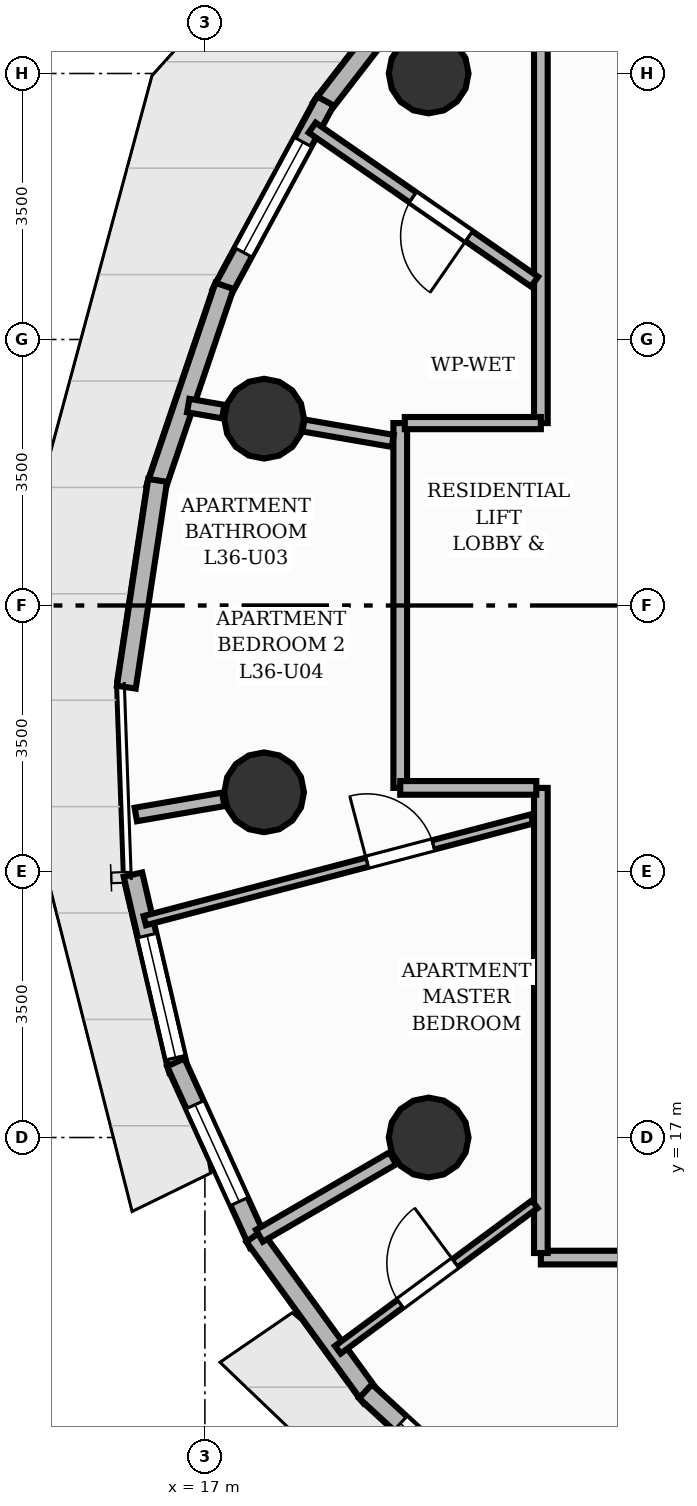
"""IFC4 building model, lengths in metres.
Left out: names, types, materials, properties, quantities, classifications, styles, units other than length and angle.
Written with IfcOpenShell. Run it as: python <this file> out.ifc"""

import sys

from ifc_helpers import new_model, si_unit, direction, frame, frame_2d, origin, origin_2d, place, context, subcontext, project, spatial, rectangle, circle, extrude, element, fill, save


model = new_model("IFC4")
c1 = context("Model", 3, precision=1e-05, world=origin(), true_north=direction((0.0, 1.0)))
c2 = subcontext(c1, "Body", "Model", "MODEL_VIEW")
j1 = project(units=[si_unit("LENGTHUNIT", "METRE"), si_unit("PLANEANGLEUNIT", "RADIAN")], contexts=[c1])
p1 = place(None, origin())
s1 = spatial("IfcSite", under=j1, at=p1, CompositionType="ELEMENT")
p2 = place(p1, origin())
s2 = spatial("IfcBuilding", under=s1, at=p2, CompositionType="ELEMENT")
p3 = place(p2, frame((0.0, 0.0, 123.36)))
s3 = spatial("IfcBuildingStorey", under=s2, at=p3, CompositionType="ELEMENT", Elevation=123.36)
for number, where, z_axis, x_axis in (
    (1, (19.944, 31.0, 0.0), (0.0, 0.0, 1.0), (1.0, 0.0, 0.0)),
    (2, (17.779, 26.458, 0.0), (0.0, 0.0, 1.0), (1.0, 0.0, 0.0)),
    (3, (17.779, 21.542, 0.0), (0.0, 0.0, 1.0), (1.0, 0.0, 0.0)),
    (4, (19.944, 17.0, 0.0), (0.0, 0.0, 1.0), (1.0, 0.0, 0.0)),
):
    element("IfcColumn", number, at=place(p3, frame(where, z_axis=z_axis, x_axis=x_axis)), inside=s3, PredefinedType="COLUMN", context=c2, shape_type="SweptSolid", body=[
        extrude(circle(Radius=0.525, at=origin_2d()), origin(), (0.0, 0.0, 1.0), 3.2),
    ])
p4 = place(p3, frame((18.525, 30.546, 0.0), z_axis=(0.0, 0.0, 1.0), x_axis=(0.611416743811, 0.791308767415, 0.0)))
e5 = element("IfcWall", 5, at=p4, inside=s3, PredefinedType="SOLIDWALL", context=c2, shape_type="SweptSolid", body=[
    extrude(rectangle(XDim=2.937, YDim=0.25, at=frame_2d((1.468, 0.0))), origin(), (0.0, 0.0, 1.0), 2.96),
])
p5 = place(p3, frame((17.213, 28.104, 0.0), z_axis=(0.0, 0.0, 1.0), x_axis=(0.476018404115, 0.879435318226, 0.0)))
e6 = element("IfcWall", 6, at=p5, inside=s3, PredefinedType="SOLIDWALL", context=c2, shape_type="SweptSolid", body=[
    extrude(rectangle(XDim=2.882, YDim=0.25, at=frame_2d((1.441, 0.0))), origin(), (0.0, 0.0, 1.0), 2.96),
])
p6 = place(p5, frame((0.616, 0.0, 0.85)))
e7 = element("IfcOpeningElement", 7, at=p6, cuts=e6, PredefinedType="OPENING", context=c2, shape_type="SweptSolid", body=[
    extrude(rectangle(XDim=1.65, YDim=1.55, at=frame_2d((0.825, 0.775))), frame((0.0, 0.135, 0.0), z_axis=(0.0, -1.0, 0.0), x_axis=(1.0, 0.0, 0.0)), (0.0, 0.0, 1.0), 0.27),
])
p7 = place(p3, frame((16.351, 25.538, 0.0), z_axis=(0.0, 0.0, 1.0), x_axis=(0.321473951892, 0.946918422175, 0.0)))
e8 = element("IfcWall", 8, at=p7, inside=s3, PredefinedType="SOLIDWALL", context=c2, shape_type="SweptSolid", body=[
    extrude(rectangle(XDim=2.818, YDim=0.25, at=frame_2d((1.409, 0.0))), origin(), (0.0, 0.0, 1.0), 2.96),
])
p8 = place(p3, frame((15.966, 22.925, 0.0), z_axis=(0.0, 0.0, 1.0), x_axis=(0.149576734229, 0.988750120393, 0.0)))
e9 = element("IfcWall", 9, at=p8, inside=s3, PredefinedType="SOLIDWALL", context=c2, shape_type="SweptSolid", body=[
    extrude(rectangle(XDim=2.752, YDim=0.25, at=frame_2d((1.376, 0.0))), origin(), (0.0, 0.0, 1.0), 2.96),
])
p9 = place(p3, frame((16.654, 17.88, 0.0), z_axis=(0.0, 0.0, 1.0), x_axis=(-0.226865331245, 0.973926137589, 0.0)))
e10 = element("IfcWall", 10, at=p9, inside=s3, PredefinedType="SOLIDWALL", context=c2, shape_type="SweptSolid", body=[
    extrude(rectangle(XDim=2.648, YDim=0.25, at=frame_2d((1.324, 0.0))), origin(), (0.0, 0.0, 1.0), 2.96),
])
p10 = place(p9, frame((0.175, 0.0, 0.85)))
e11 = element("IfcOpeningElement", 11, at=p10, cuts=e10, PredefinedType="OPENING", context=c2, shape_type="SweptSolid", body=[
    extrude(rectangle(XDim=1.65, YDim=1.55, at=frame_2d((0.825, 0.775))), frame((0.0, 0.135, 0.0), z_axis=(0.0, -1.0, 0.0), x_axis=(1.0, 0.0, 0.0)), (0.0, 0.0, 1.0), 0.27),
])
p11 = place(p3, frame((17.705, 15.6, 0.0), z_axis=(0.0, 0.0, 1.0), x_axis=(-0.41458087789, 0.910012470073, 0.0)))
e12 = element("IfcWall", 12, at=p11, inside=s3, PredefinedType="SOLIDWALL", context=c2, shape_type="SweptSolid", body=[
    extrude(rectangle(XDim=2.624, YDim=0.25, at=frame_2d((1.312, 0.0))), origin(), (0.0, 0.0, 1.0), 2.96),
])
p12 = place(p11, frame((0.612, 0.0, 0.85)))
e13 = element("IfcOpeningElement", 13, at=p12, cuts=e12, PredefinedType="OPENING", context=c2, shape_type="SweptSolid", body=[
    extrude(rectangle(XDim=1.4, YDim=1.55, at=frame_2d((0.7, 0.775))), frame((0.0, 0.135, 0.0), z_axis=(0.0, -1.0, 0.0), x_axis=(1.0, 0.0, 0.0)), (0.0, 0.0, 1.0), 0.27),
])
p13 = place(p3, frame((19.189, 13.576, 0.0), z_axis=(0.0, 0.0, 1.0), x_axis=(-0.587574137145, 0.80917033643, 0.0)))
e14 = element("IfcWall", 14, at=p13, inside=s3, PredefinedType="SOLIDWALL", context=c2, shape_type="SweptSolid", body=[
    extrude(rectangle(XDim=2.624, YDim=0.25, at=frame_2d((1.312, 0.0))), origin(), (0.0, 0.0, 1.0), 2.96),
])
p14 = place(p3, frame((21.061, 11.868, 0.0), z_axis=(0.0, 0.0, 1.0), x_axis=(-0.73572884951, 0.677276206579, 0.0)))
e15 = element("IfcWall", 15, at=p14, inside=s3, PredefinedType="SOLIDWALL", context=c2, shape_type="SweptSolid", body=[
    extrude(rectangle(XDim=2.648, YDim=0.25, at=frame_2d((1.324, 0.0))), origin(), (0.0, 0.0, 1.0), 2.96),
])
p15 = place(p14, frame((0.624, 0.0, 0.85)))
e16 = element("IfcOpeningElement", 16, at=p15, cuts=e15, PredefinedType="OPENING", context=c2, shape_type="SweptSolid", body=[
    extrude(rectangle(XDim=1.4, YDim=1.55, at=frame_2d((0.7, 0.775))), frame((0.0, 0.135, 0.0), z_axis=(0.0, -1.0, 0.0), x_axis=(1.0, 0.0, 0.0)), (0.0, 0.0, 1.0), 0.27),
])
p16 = place(p3, frame((17.242, 26.551, 0.0), z_axis=(0.0, 0.0, 1.0), x_axis=(-0.985345448397, 0.170570651999, 0.0)))
e17 = element("IfcWall", 17, at=p16, inside=s3, PredefinedType="PARTITIONING", context=c2, shape_type="SweptSolid", body=[
    extrude(rectangle(XDim=0.468, YDim=0.18, at=frame_2d((0.234, 0.0))), origin(), (0.0, 0.0, 1.0), 2.336),
])
p17 = place(p3, frame((17.242, 21.449, 0.0), z_axis=(0.0, 0.0, 1.0), x_axis=(-0.98537549431, -0.170396992969, 0.0)))
e18 = element("IfcWall", 18, at=p17, inside=s3, PredefinedType="PARTITIONING", context=c2, shape_type="SweptSolid", body=[
    extrude(rectangle(XDim=1.168, YDim=0.18, at=frame_2d((0.584, 0.0))), origin(), (0.0, 0.0, 1.0), 2.336),
])
p18 = place(p3, frame((19.472, 16.726, 0.0), z_axis=(0.0, 0.0, 1.0), x_axis=(-0.86481084581, -0.502097800203, 0.0)))
e19 = element("IfcWall", 19, at=p18, inside=s3, PredefinedType="PARTITIONING", context=c2, shape_type="SweptSolid", body=[
    extrude(rectangle(XDim=2.03, YDim=0.18, at=frame_2d((1.015, 0.0))), origin(), (0.0, 0.0, 1.0), 2.336),
])
p19 = place(p3, frame((21.42, 26.4, 0.0), z_axis=(0.0, 0.0, 1.0), x_axis=(0.0, 1.0, 0.0)))
e20 = element("IfcWall", 20, at=p19, inside=s3, PredefinedType="PARTITIONING", context=c2, shape_type="SweptSolid", body=[
    extrude(rectangle(XDim=6.12, YDim=0.18, at=frame_2d((3.06, 0.0))), origin(), (0.0, 0.0, 1.0), 2.955),
])
p20 = place(p3, frame((19.57, 21.6, 0.0), z_axis=(0.0, 0.0, 1.0), x_axis=(0.0, 1.0, 0.0)))
e21 = element("IfcWall", 21, at=p20, inside=s3, PredefinedType="PARTITIONING", context=c2, shape_type="SweptSolid", body=[
    extrude(rectangle(XDim=4.8, YDim=0.18, at=frame_2d((2.4, 0.0))), origin(), (0.0, 0.0, 1.0), 2.955),
])
p21 = place(p3, frame((19.63, 26.4, 0.0), z_axis=(0.0, 0.0, 1.0), x_axis=(1.0, 0.0, 0.0)))
e22 = element("IfcWall", 22, at=p21, inside=s3, PredefinedType="PLUMBINGWALL", context=c2, shape_type="SweptSolid", body=[
    extrude(rectangle(XDim=1.79, YDim=0.16, at=frame_2d((0.895, 0.0))), origin(), (0.0, 0.0, 1.0), 2.955),
])
p22 = place(p3, frame((29.141, 15.42, 0.0), z_axis=(0.0, 0.0, 1.0), x_axis=(-1.0, 0.0, 0.0)))
e23 = element("IfcWall", 23, at=p22, inside=s3, PredefinedType="PARTITIONING", context=c2, shape_type="SweptSolid", body=[
    extrude(rectangle(XDim=7.721, YDim=0.18, at=frame_2d((3.861, 0.0))), origin(), (0.0, 0.0, 1.0), 2.955),
])
p23 = place(p22, frame((3.336, 0.0, 0.0)))
e24 = element("IfcOpeningElement", 24, at=p23, cuts=e23, PredefinedType="OPENING", context=c2, shape_type="SweptSolid", body=[
    extrude(rectangle(XDim=1.05, YDim=2.15, at=frame_2d((0.525, 1.075))), frame((0.0, 0.1, 0.0), z_axis=(0.0, -1.0, 0.0), x_axis=(1.0, 0.0, 0.0)), (0.0, 0.0, 1.0), 0.2),
])
p24 = place(p3, frame((21.42, 15.48, 0.0), z_axis=(0.0, 0.0, 1.0), x_axis=(0.0, 1.0, 0.0)))
e25 = element("IfcWall", 25, at=p24, inside=s3, PredefinedType="PARTITIONING", context=c2, shape_type="SweptSolid", body=[
    extrude(rectangle(XDim=6.12, YDim=0.18, at=frame_2d((3.06, 0.0))), origin(), (0.0, 0.0, 1.0), 2.955),
])
p25 = place(p3, frame((21.36, 21.6, 0.0), z_axis=(0.0, 0.0, 1.0), x_axis=(-1.0, 0.0, 0.0)))
e26 = element("IfcWall", 26, at=p25, inside=s3, PredefinedType="PARTITIONING", context=c2, shape_type="SweptSolid", body=[
    extrude(rectangle(XDim=1.79, YDim=0.18, at=frame_2d((0.895, 0.0))), origin(), (0.0, 0.0, 1.0), 2.336),
])
p26 = place(p3, frame((21.338, 28.26, 0.0), z_axis=(0.0, 0.0, 1.0), x_axis=(-0.822095882312, 0.569349067168, 0.0)))
e27 = element("IfcWall", 27, at=p26, inside=s3, PredefinedType="PLUMBINGWALL", context=c2, shape_type="SweptSolid", body=[
    extrude(rectangle(XDim=3.56, YDim=0.16, at=frame_2d((1.78, 0.0))), origin(), (0.0, 0.0, 1.0), 2.692),
])
p27 = place(p26, frame((1.05, 0.0, 0.0)))
e28 = element("IfcOpeningElement", 28, at=p27, cuts=e27, PredefinedType="OPENING", context=c2, shape_type="SweptSolid", body=[
    extrude(rectangle(XDim=0.9, YDim=2.1, at=frame_2d((0.45, 1.05))), frame((0.0, 0.09, 0.0), z_axis=(0.0, -1.0, 0.0), x_axis=(1.0, 0.0, 0.0)), (0.0, 0.0, 1.0), 0.18),
])
p28 = place(p3, frame((19.471, 26.166, 0.0), z_axis=(0.0, 0.0, 1.0), x_axis=(-0.985385550807, 0.170338827815, 0.0)))
e29 = element("IfcWall", 29, at=p28, inside=s3, PredefinedType="PLUMBINGWALL", context=c2, shape_type="SweptSolid", body=[
    extrude(rectangle(XDim=1.192, YDim=0.16, at=frame_2d((0.596, 0.0))), origin(), (0.0, 0.0, 1.0), 2.336),
])
p29 = place(p3, frame((18.749, 14.207, 0.0), z_axis=(0.0, 0.0, 1.0), x_axis=(0.804182442208, 0.594382536456, 0.0)))
e30 = element("IfcWall", 30, at=p29, inside=s3, PredefinedType="PARTITIONING", context=c2, shape_type="SweptSolid", body=[
    extrude(rectangle(XDim=3.221, YDim=0.125, at=frame_2d((1.611, 0.0))), origin(), (0.0, 0.0, 1.0), 2.955),
])
p30 = place(p29, frame((1.021, 0.0, 0.0)))
e31 = element("IfcOpeningElement", 31, at=p30, cuts=e30, PredefinedType="OPENING", context=c2, shape_type="SweptSolid", body=[
    extrude(rectangle(XDim=0.9, YDim=2.1, at=frame_2d((0.45, 1.05))), frame((0.0, 0.073, 0.0), z_axis=(0.0, -1.0, 0.0), x_axis=(1.0, 0.0, 0.0)), (0.0, 0.0, 1.0), 0.145),
])
p31 = place(p3, frame((16.209, 19.854, 0.0), z_axis=(0.0, 0.0, 1.0), x_axis=(0.967214885104, 0.253959378707, 0.0)))
e32 = element("IfcWall", 32, at=p31, inside=s3, PredefinedType="PARTITIONING", context=c2, shape_type="SweptSolid", body=[
    extrude(rectangle(XDim=5.267, YDim=0.125, at=frame_2d((2.634, 0.0))), origin(), (0.0, 0.0, 1.0), 2.955),
])
p32 = place(p31, frame((3.024, 0.0, 0.0)))
e33 = element("IfcOpeningElement", 33, at=p32, cuts=e32, PredefinedType="OPENING", context=c2, shape_type="SweptSolid", body=[
    extrude(rectangle(XDim=0.9, YDim=2.1, at=frame_2d((0.45, 1.05))), frame((0.0, 0.073, 0.0), z_axis=(0.0, -1.0, 0.0), x_axis=(1.0, 0.0, 0.0)), (0.0, 0.0, 1.0), 0.145),
])
p33 = place(p6, origin())
e34 = element("IfcWindow", 34, at=p33, inside=s3, PartitioningType="SINGLE_PANEL", PredefinedType="WINDOW", context=c2, shape_type="SweptSolid", body=[
    extrude(rectangle(XDim=1.65, YDim=1.55, at=frame_2d((0.825, 0.775))), frame((0.0, 0.03, 0.0), z_axis=(0.0, -1.0, 0.0), x_axis=(1.0, 0.0, 0.0)), (0.0, 0.0, 1.0), 0.06),
])
fill(e7, e34)
p34 = place(p10, origin())
e35 = element("IfcWindow", 35, at=p34, inside=s3, PartitioningType="SINGLE_PANEL", PredefinedType="WINDOW", context=c2, shape_type="SweptSolid", body=[
    extrude(rectangle(XDim=1.65, YDim=1.55, at=frame_2d((0.825, 0.775))), frame((0.0, 0.03, 0.0), z_axis=(0.0, -1.0, 0.0), x_axis=(1.0, 0.0, 0.0)), (0.0, 0.0, 1.0), 0.06),
])
fill(e11, e35)
p35 = place(p12, origin())
e36 = element("IfcWindow", 36, at=p35, inside=s3, PartitioningType="SINGLE_PANEL", PredefinedType="WINDOW", context=c2, shape_type="SweptSolid", body=[
    extrude(rectangle(XDim=1.4, YDim=1.55, at=frame_2d((0.7, 0.775))), frame((0.0, 0.03, 0.0), z_axis=(0.0, -1.0, 0.0), x_axis=(1.0, 0.0, 0.0)), (0.0, 0.0, 1.0), 0.06),
])
fill(e13, e36)
p36 = place(p15, origin())
e37 = element("IfcWindow", 37, at=p36, inside=s3, PartitioningType="SINGLE_PANEL", PredefinedType="WINDOW", context=c2, shape_type="SweptSolid", body=[
    extrude(rectangle(XDim=1.4, YDim=1.55, at=frame_2d((0.7, 0.775))), frame((0.0, 0.03, 0.0), z_axis=(0.0, -1.0, 0.0), x_axis=(1.0, 0.0, 0.0)), (0.0, 0.0, 1.0), 0.06),
])
fill(e16, e37)
p37 = place(p27, origin())
e38 = element("IfcDoor", 38, at=p37, inside=s3, OperationType="SINGLE_SWING_LEFT", PredefinedType="DOOR", context=c2, shape_type="SweptSolid", body=[
    extrude(rectangle(XDim=0.9, YDim=2.1, at=frame_2d((0.45, 1.05))), frame((0.0, 0.025, 0.0), z_axis=(0.0, -1.0, 0.0), x_axis=(1.0, 0.0, 0.0)), (0.0, 0.0, 1.0), 0.05),
])
fill(e28, e38)
p38 = place(p30, origin())
e39 = element("IfcDoor", 39, at=p38, inside=s3, OperationType="SINGLE_SWING_RIGHT", PredefinedType="DOOR", context=c2, shape_type="SweptSolid", body=[
    extrude(rectangle(XDim=0.9, YDim=2.1, at=frame_2d((0.45, 1.05))), frame((0.0, 0.025, 0.0), z_axis=(0.0, -1.0, 0.0), x_axis=(1.0, 0.0, 0.0)), (0.0, 0.0, 1.0), 0.05),
])
fill(e31, e39)
p39 = place(p32, origin())
e40 = element("IfcDoor", 40, at=p39, inside=s3, OperationType="SINGLE_SWING_LEFT", PredefinedType="DOOR", context=c2, shape_type="SweptSolid", body=[
    extrude(rectangle(XDim=0.9, YDim=2.1, at=frame_2d((0.45, 1.05))), frame((0.0, 0.025, 0.0), z_axis=(0.0, -1.0, 0.0), x_axis=(1.0, 0.0, 0.0)), (0.0, 0.0, 1.0), 0.05),
])
fill(e33, e40)
save(model, sys.argv[1])
